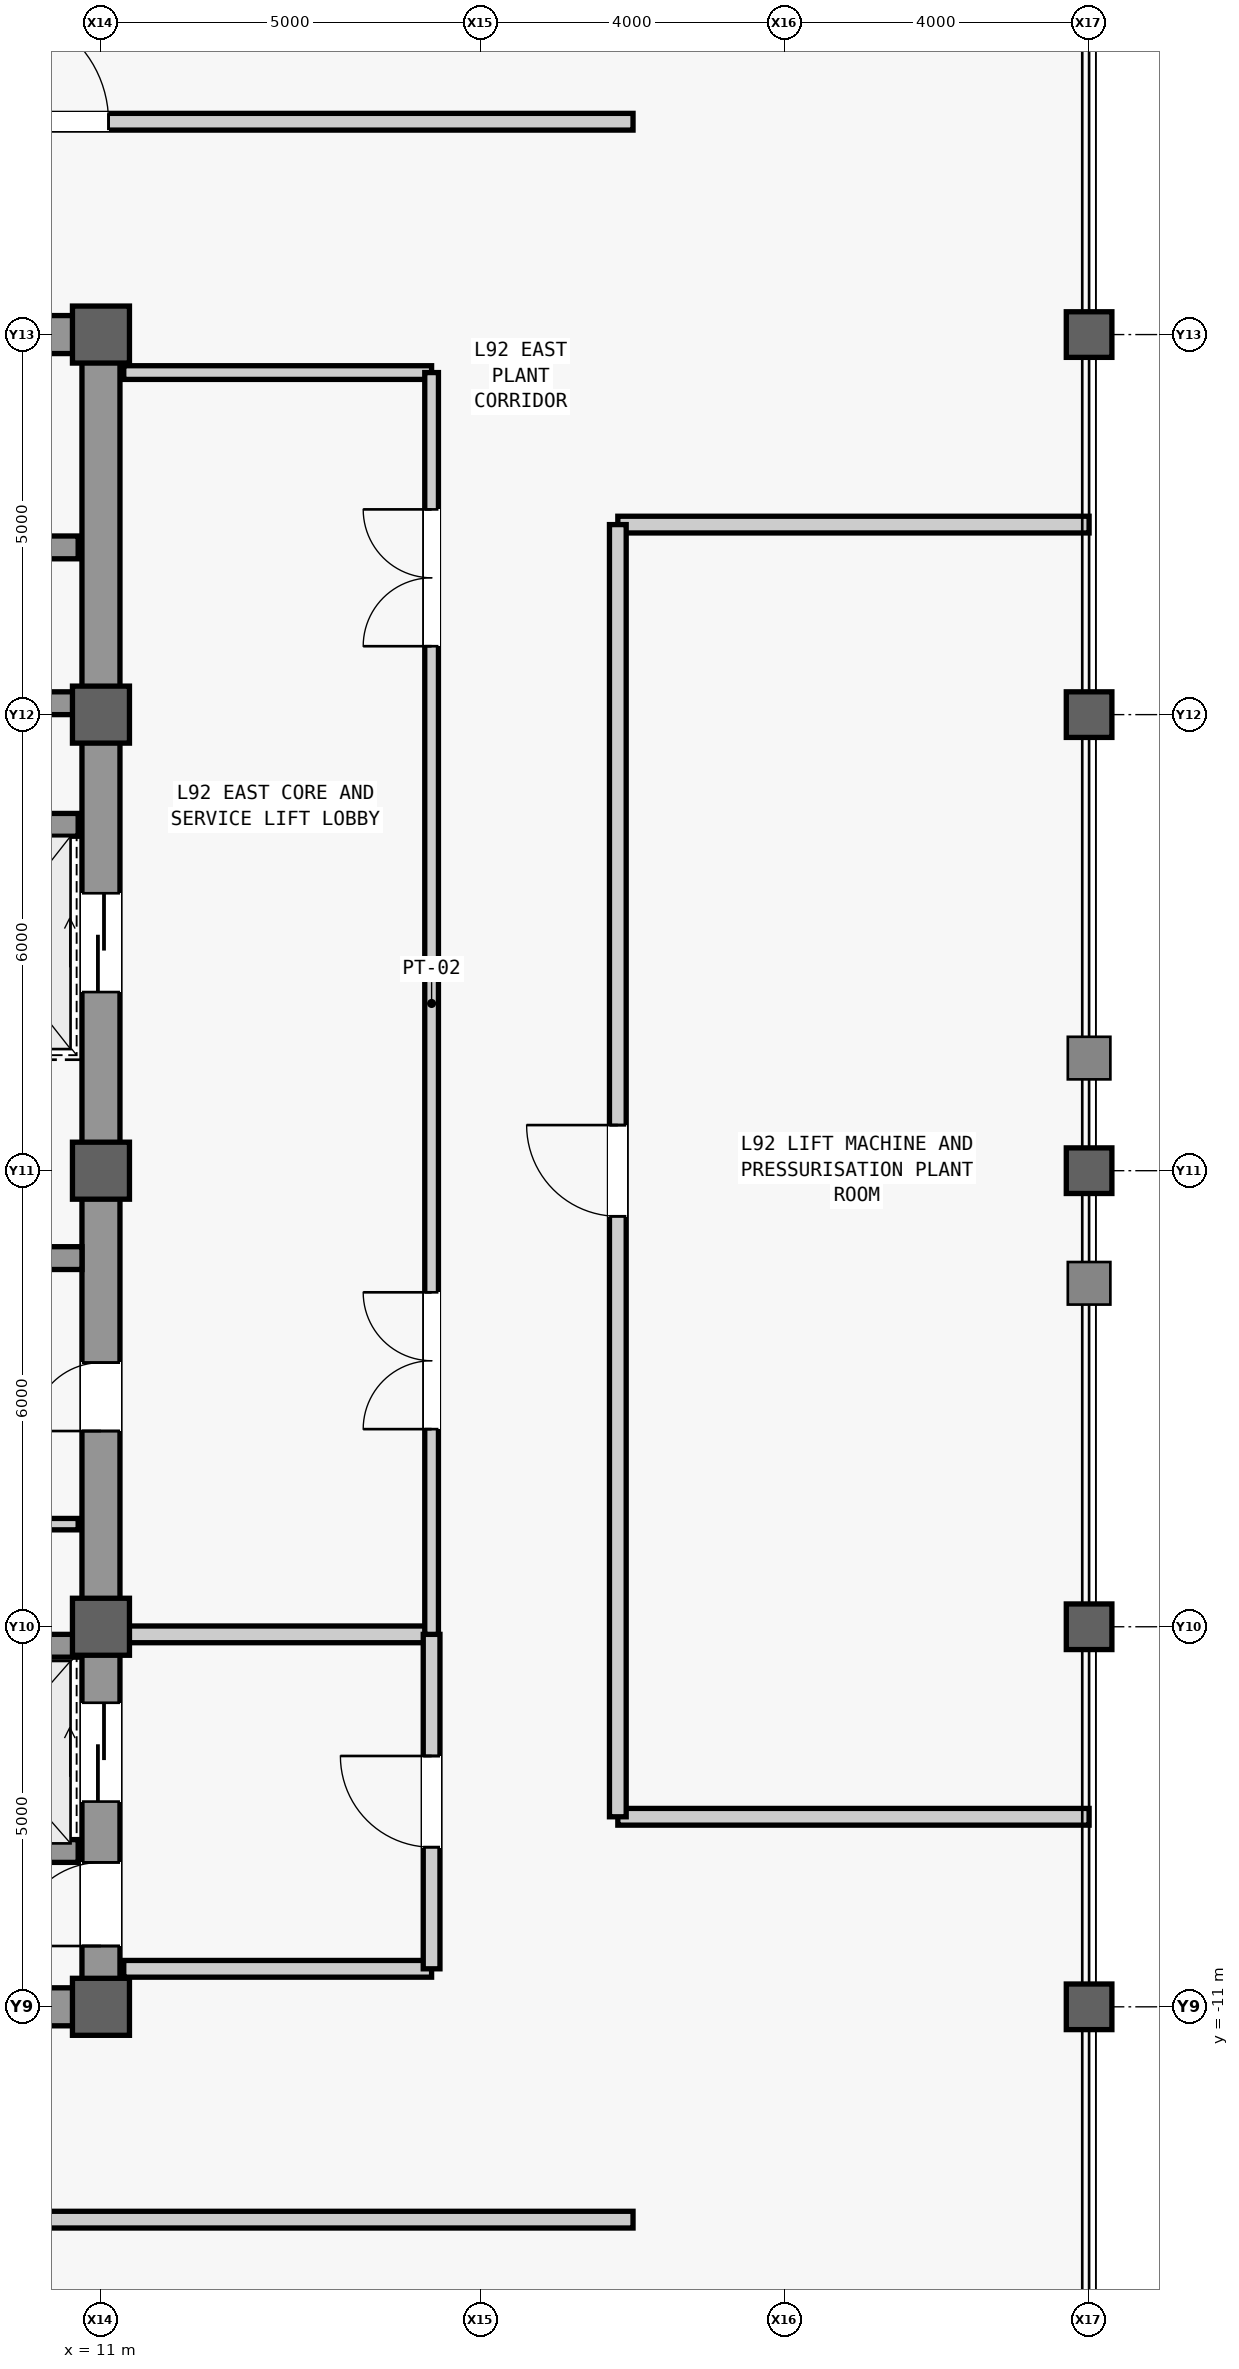
"""IFC4 building model, lengths in metres.
Left out: names, types, materials, properties, quantities, classifications, styles, units other than length and angle.
Written with IfcOpenShell. Run it as: python <this file> out.ifc"""

import sys

from ifc_helpers import new_model, si_unit, direction, frame, frame_2d, origin, origin_2d, place, context, subcontext, project, spatial, rectangle, hollow_rectangle, extrude, source, transform, mapped, element, fill, save


model = new_model("IFC4")
c1 = context("Model", 3, precision=1e-05, world=origin(), true_north=direction((0.0, 1.0)))
c2 = subcontext(c1, "Body", "Model", "MODEL_VIEW")
j1 = project(units=[si_unit("LENGTHUNIT", "METRE"), si_unit("PLANEANGLEUNIT", "RADIAN")], contexts=[c1])
p1 = place(None, origin())
s1 = spatial("IfcSite", under=j1, at=p1, CompositionType="ELEMENT")
p2 = place(p1, origin())
s2 = spatial("IfcBuilding", under=s1, at=p2, CompositionType="ELEMENT")
p3 = place(p2, frame((0.0, 0.0, 389.9)))
s3 = spatial("IfcBuildingStorey", under=s2, at=p3, CompositionType="ELEMENT", Elevation=389.9)
m1 = source(origin(), c2, "Body", "SweptSolid", [
    extrude(rectangle(XDim=22.0, YDim=0.5, at=frame_2d((11.0, 0.0))), origin(), (0.0, 0.0, 1.0), 4.45),
])
p4 = place(p3, frame((11.0, -11.0, 0.0), z_axis=(0.0, 0.0, 1.0), x_axis=(0.0, 1.0, 0.0)))
e1 = element("IfcWall", 1, at=p4, inside=s3, PredefinedType="SHEAR", context=c2, shape_type="MappedRepresentation", body=[
    mapped(m1, transform((0.0, 0.0, 0.0), scale=1.0)),
])
m2 = source(origin(), c2, "Body", "SweptSolid", [
    extrude(rectangle(XDim=1.1, YDim=2.2, at=frame_2d((0.55, 1.1))), frame((0.0, 0.26, 0.0), z_axis=(0.0, -1.0, 0.0), x_axis=(1.0, 0.0, 0.0)), (0.0, 0.0, 1.0), 0.52),
])
p5 = place(p4, frame((0.8, 0.0, 0.0)))
e2 = element("IfcOpeningElement", 2, at=p5, cuts=e1, PredefinedType="OPENING", context=c2, shape_type="MappedRepresentation", body=[
    mapped(m2, transform((0.0, 0.0, 0.0), scale=1.0)),
])
m3 = source(origin(), c2, "Body", "SweptSolid", [
    extrude(rectangle(XDim=0.9, YDim=2.15, at=frame_2d((0.45, 1.075))), frame((0.0, 0.26, 0.0), z_axis=(0.0, -1.0, 0.0), x_axis=(1.0, 0.0, 0.0)), (0.0, 0.0, 1.0), 0.52),
])
p6 = place(p4, frame((7.575, 0.0, 0.0)))
e3 = element("IfcOpeningElement", 3, at=p6, cuts=e1, PredefinedType="OPENING", context=c2, shape_type="MappedRepresentation", body=[
    mapped(m3, transform((0.0, 0.0, 0.0), scale=1.0)),
])
m4 = source(origin(), c2, "Body", "SweptSolid", [
    extrude(rectangle(XDim=1.3, YDim=2.3, at=frame_2d((0.65, 1.15))), frame((0.0, 0.26, 0.0), z_axis=(0.0, -1.0, 0.0), x_axis=(1.0, 0.0, 0.0)), (0.0, 0.0, 1.0), 0.52),
])
p7 = place(p4, frame((2.7, 0.0, 0.0)))
e4 = element("IfcOpeningElement", 4, at=p7, cuts=e1, PredefinedType="OPENING", context=c2, shape_type="MappedRepresentation", body=[
    mapped(m4, transform((0.0, 0.0, 0.0), scale=1.0)),
])
p8 = place(p4, frame((13.35, 0.0, 0.0)))
e5 = element("IfcOpeningElement", 5, at=p8, cuts=e1, PredefinedType="OPENING", context=c2, shape_type="MappedRepresentation", body=[
    mapped(m4, transform((0.0, 0.0, 0.0), scale=1.0)),
])
m5 = source(origin(), c2, "Body", "SweptSolid", [
    extrude(rectangle(XDim=5.9, YDim=0.5, at=frame_2d((2.95, 0.0))), origin(), (0.0, 0.0, 1.0), 4.45),
])
p9 = place(p3, frame((4.85, -11.0, 0.0), z_axis=(0.0, 0.0, 1.0), x_axis=(1.0, 0.0, 0.0)))
e6 = element("IfcWall", 6, at=p9, inside=s3, PredefinedType="SHEAR", context=c2, shape_type="MappedRepresentation", body=[
    mapped(m5, transform((0.0, 0.0, 0.0), scale=1.0)),
])
p10 = place(p3, frame((4.85, 11.0, 0.0), z_axis=(0.0, 0.0, 1.0), x_axis=(1.0, 0.0, 0.0)))
e7 = element("IfcWall", 7, at=p10, inside=s3, PredefinedType="SHEAR", context=c2, shape_type="MappedRepresentation", body=[
    mapped(m5, transform((0.0, 0.0, 0.0), scale=1.0)),
])
p11 = place(p10, frame((0.5, 0.0, 0.0)))
e8 = element("IfcOpeningElement", 8, at=p11, cuts=e7, PredefinedType="OPENING", context=c2, shape_type="MappedRepresentation", body=[
    mapped(m3, transform((0.0, 0.0, 0.0), scale=1.0)),
])
m6 = source(origin(), c2, "Body", "SweptSolid", [
    extrude(rectangle(XDim=5.65, YDim=0.3, at=frame_2d((2.825, 0.0))), origin(), (0.0, 0.0, 1.0), 4.45),
])
p12 = place(p3, frame((5.1, -1.15, 0.0), z_axis=(0.0, 0.0, 1.0), x_axis=(1.0, 0.0, 0.0)))
e9 = element("IfcWall", 9, at=p12, inside=s3, PredefinedType="SHEAR", context=c2, shape_type="MappedRepresentation", body=[
    mapped(m6, transform((0.0, 0.0, 0.0), scale=1.0)),
])
m7 = source(origin(), c2, "Body", "SweptSolid", [
    extrude(rectangle(XDim=0.75, YDim=0.75, at=origin_2d()), origin(), (0.0, 0.0, 1.0), 4.8),
])
for number, where, z_axis, x_axis in (
    (10, (11.0, -11.0, 0.0), (0.0, 0.0, 1.0), (1.0, 0.0, 0.0)),
    (11, (11.0, -6.0, 0.0), (0.0, 0.0, 1.0), (1.0, 0.0, 0.0)),
    (12, (11.0, 0.0, 0.0), (0.0, 0.0, 1.0), (1.0, 0.0, 0.0)),
    (13, (11.0, 6.0, 0.0), (0.0, 0.0, 1.0), (1.0, 0.0, 0.0)),
    (14, (11.0, 11.0, 0.0), (0.0, 0.0, 1.0), (1.0, 0.0, 0.0)),
):
    element("IfcColumn", number, at=place(p3, frame(where, z_axis=z_axis, x_axis=x_axis)), inside=s3, PredefinedType="COLUMN", context=c2, shape_type="MappedRepresentation", body=[
        mapped(m7, transform((0.0, 0.0, 0.0), scale=1.0)),
    ])
m8 = source(origin(), c2, "Body", "SweptSolid", [
    extrude(hollow_rectangle(XDim=0.6, YDim=0.6, WallThickness=0.035, at=origin_2d()), origin(), (0.0, 0.0, 1.0), 4.8),
])
for number, where, z_axis, x_axis in (
    (15, (24.0, -11.0, 0.0), (0.0, 0.0, 1.0), (1.0, 0.0, 0.0)),
    (16, (24.0, -6.0, 0.0), (0.0, 0.0, 1.0), (1.0, 0.0, 0.0)),
    (17, (24.0, 0.0, 0.0), (0.0, 0.0, 1.0), (1.0, 0.0, 0.0)),
    (18, (24.0, 6.0, 0.0), (0.0, 0.0, 1.0), (1.0, 0.0, 0.0)),
    (19, (24.0, 11.0, 0.0), (0.0, 0.0, 1.0), (1.0, 0.0, 0.0)),
):
    element("IfcColumn", number, at=place(p3, frame(where, z_axis=z_axis, x_axis=x_axis)), inside=s3, PredefinedType="COLUMN", context=c2, shape_type="MappedRepresentation", body=[
        mapped(m8, transform((0.0, 0.0, 0.0), scale=1.0)),
    ])
m9 = source(origin(), c2, "Body", "SweptSolid", [
    extrude(rectangle(XDim=2.2, YDim=0.3, at=frame_2d((1.1, 0.0))), origin(), (0.0, 0.0, 1.0), 4.45),
])
for number, where, z_axis, x_axis in (
    (20, (8.5, -8.95, 0.0), (0.0, 0.0, 1.0), (1.0, 0.0, 0.0)),
    (21, (8.5, -6.25, 0.0), (0.0, 0.0, 1.0), (1.0, 0.0, 0.0)),
):
    element("IfcWall", number, at=place(p3, frame(where, z_axis=z_axis, x_axis=x_axis)), inside=s3, PredefinedType="SHEAR", context=c2, shape_type="MappedRepresentation", body=[
        mapped(m9, transform((0.0, 0.0, 0.0), scale=1.0)),
    ])
m10 = source(origin(), c2, "Body", "SweptSolid", [
    extrude(rectangle(XDim=2.3, YDim=0.3, at=frame_2d((1.15, 0.0))), origin(), (0.0, 0.0, 1.0), 4.45),
])
for number, where, z_axis, x_axis in (
    (22, (8.4, 4.55, 0.0), (0.0, 0.0, 1.0), (1.0, 0.0, 0.0)),
    (23, (8.4, 6.15, 0.0), (0.0, 0.0, 1.0), (1.0, 0.0, 0.0)),
    (24, (8.4, 8.2, 0.0), (0.0, 0.0, 1.0), (1.0, 0.0, 0.0)),
):
    element("IfcWall", number, at=place(p3, frame(where, z_axis=z_axis, x_axis=x_axis)), inside=s3, PredefinedType="SHEAR", context=c2, shape_type="MappedRepresentation", body=[
        mapped(m10, transform((0.0, 0.0, 0.0), scale=1.0)),
    ])
m11 = source(origin(), c2, "Body", "SweptSolid", [
    extrude(rectangle(XDim=2.05, YDim=0.15, at=frame_2d((1.025, 0.0))), origin(), (0.0, 0.0, 1.0), 4.45),
])
p13 = place(p3, frame((8.65, -4.65, 0.0), z_axis=(0.0, 0.0, 1.0), x_axis=(1.0, 0.0, 0.0)))
e25 = element("IfcWall", 25, at=p13, inside=s3, PredefinedType="PARTITIONING", context=c2, shape_type="MappedRepresentation", body=[
    mapped(m11, transform((0.0, 0.0, 0.0), scale=1.0)),
])
m12 = source(origin(), c2, "Body", "SweptSolid", [
    extrude(rectangle(XDim=4.05, YDim=0.22, at=frame_2d((2.025, 0.0))), origin(), (0.0, 0.0, 1.0), 4.45),
])
p14 = place(p3, frame((11.3, -10.5, 0.0), z_axis=(0.0, 0.0, 1.0), x_axis=(1.0, 0.0, 0.0)))
e26 = element("IfcWall", 26, at=p14, inside=s3, PredefinedType="PARTITIONING", context=c2, shape_type="MappedRepresentation", body=[
    mapped(m12, transform((0.0, 0.0, 0.0), scale=1.0)),
])
m13 = source(origin(), c2, "Body", "SweptSolid", [
    extrude(rectangle(XDim=4.05, YDim=0.22, at=frame_2d((2.025, 0.0))), origin(), (0.0, 0.0, 1.0), 3.901),
])
p15 = place(p3, frame((11.3, -6.1, 0.0), z_axis=(0.0, 0.0, 1.0), x_axis=(1.0, 0.0, 0.0)))
e27 = element("IfcWall", 27, at=p15, inside=s3, PredefinedType="PARTITIONING", context=c2, shape_type="MappedRepresentation", body=[
    mapped(m13, transform((0.0, 0.0, 0.0), scale=1.0)),
])
m14 = source(origin(), c2, "Body", "SweptSolid", [
    extrude(rectangle(XDim=4.4, YDim=0.22, at=frame_2d((2.2, 0.0))), origin(), (0.0, 0.0, 1.0), 4.45),
])
p16 = place(p3, frame((15.35, -10.5, 0.0), z_axis=(0.0, 0.0, 1.0), x_axis=(0.0, 1.0, 0.0)))
e28 = element("IfcWall", 28, at=p16, inside=s3, PredefinedType="PARTITIONING", context=c2, shape_type="MappedRepresentation", body=[
    mapped(m14, transform((0.0, 0.0, 0.0), scale=1.0)),
])
m15 = source(origin(), c2, "Body", "SweptSolid", [
    extrude(rectangle(XDim=1.2, YDim=2.2, at=frame_2d((0.6, 1.1))), frame((0.0, 0.12, 0.0), z_axis=(0.0, -1.0, 0.0), x_axis=(1.0, 0.0, 0.0)), (0.0, 0.0, 1.0), 0.24),
])
p17 = place(p16, frame((1.6, 0.0, 0.0)))
e29 = element("IfcOpeningElement", 29, at=p17, cuts=e28, PredefinedType="OPENING", context=c2, shape_type="MappedRepresentation", body=[
    mapped(m15, transform((0.0, 0.0, 0.0), scale=1.0)),
])
m16 = source(origin(), c2, "Body", "SweptSolid", [
    extrude(rectangle(XDim=4.05, YDim=0.18, at=frame_2d((2.025, 0.0))), origin(), (0.0, 0.0, 1.0), 4.45),
])
p18 = place(p3, frame((11.3, 10.5, 0.0), z_axis=(0.0, 0.0, 1.0), x_axis=(1.0, 0.0, 0.0)))
e30 = element("IfcWall", 30, at=p18, inside=s3, PredefinedType="PARTITIONING", context=c2, shape_type="MappedRepresentation", body=[
    mapped(m16, transform((0.0, 0.0, 0.0), scale=1.0)),
])
m17 = source(origin(), c2, "Body", "SweptSolid", [
    extrude(rectangle(XDim=16.6, YDim=0.18, at=frame_2d((8.3, 0.0))), origin(), (0.0, 0.0, 1.0), 4.45),
])
p19 = place(p3, frame((15.35, -6.1, 0.0), z_axis=(0.0, 0.0, 1.0), x_axis=(0.0, 1.0, 0.0)))
e31 = element("IfcWall", 31, at=p19, inside=s3, PredefinedType="PARTITIONING", context=c2, shape_type="MappedRepresentation", body=[
    mapped(m17, transform((0.0, 0.0, 0.0), scale=1.0)),
])
m18 = source(origin(), c2, "Body", "SweptSolid", [
    extrude(rectangle(XDim=1.8, YDim=2.25, at=frame_2d((0.9, 1.125))), frame((0.0, 0.1, 0.0), z_axis=(0.0, -1.0, 0.0), x_axis=(1.0, 0.0, 0.0)), (0.0, 0.0, 1.0), 0.2),
])
p20 = place(p19, frame((2.7, 0.0, 0.0)))
e32 = element("IfcOpeningElement", 32, at=p20, cuts=e31, PredefinedType="OPENING", context=c2, shape_type="MappedRepresentation", body=[
    mapped(m18, transform((0.0, 0.0, 0.0), scale=1.0)),
])
p21 = place(p19, frame((13.0, 0.0, 0.0)))
e33 = element("IfcOpeningElement", 33, at=p21, cuts=e31, PredefinedType="OPENING", context=c2, shape_type="MappedRepresentation", body=[
    mapped(m18, transform((0.0, 0.0, 0.0), scale=1.0)),
])
m19 = source(origin(), c2, "Body", "SweptSolid", [
    extrude(rectangle(XDim=36.0, YDim=0.22, at=frame_2d((18.0, 0.0))), origin(), (0.0, 0.0, 1.0), 4.45),
])
p22 = place(p3, frame((-18.0, -13.8, 0.0), z_axis=(0.0, 0.0, 1.0), x_axis=(1.0, 0.0, 0.0)))
e34 = element("IfcWall", 34, at=p22, inside=s3, PredefinedType="PARTITIONING", context=c2, shape_type="MappedRepresentation", body=[
    mapped(m19, transform((0.0, 0.0, 0.0), scale=1.0)),
])
m20 = source(origin(), c2, "Body", "SweptSolid", [
    extrude(rectangle(XDim=1.5, YDim=2.3, at=frame_2d((0.75, 1.15))), frame((0.0, 0.12, 0.0), z_axis=(0.0, -1.0, 0.0), x_axis=(1.0, 0.0, 0.0)), (0.0, 0.0, 1.0), 0.24),
])
p23 = place(p22, frame((12.4, 0.0, 0.0)))
e35 = element("IfcOpeningElement", 35, at=p23, cuts=e34, PredefinedType="OPENING", context=c2, shape_type="MappedRepresentation", body=[
    mapped(m20, transform((0.0, 0.0, 0.0), scale=1.0)),
])
p24 = place(p22, frame((25.4, 0.0, 0.0)))
e36 = element("IfcOpeningElement", 36, at=p24, cuts=e34, PredefinedType="OPENING", context=c2, shape_type="MappedRepresentation", body=[
    mapped(m20, transform((0.0, 0.0, 0.0), scale=1.0)),
])
p25 = place(p3, frame((-18.0, 13.8, 0.0), z_axis=(0.0, 0.0, 1.0), x_axis=(1.0, 0.0, 0.0)))
e37 = element("IfcWall", 37, at=p25, inside=s3, PredefinedType="PARTITIONING", context=c2, shape_type="MappedRepresentation", body=[
    mapped(m19, transform((0.0, 0.0, 0.0), scale=1.0)),
])
p26 = place(p25, frame((9.45, 0.0, 0.0)))
e38 = element("IfcOpeningElement", 38, at=p26, cuts=e37, PredefinedType="OPENING", context=c2, shape_type="MappedRepresentation", body=[
    mapped(m20, transform((0.0, 0.0, 0.0), scale=1.0)),
])
p27 = place(p25, frame((19.15, 0.0, 0.0)))
e39 = element("IfcOpeningElement", 39, at=p27, cuts=e37, PredefinedType="OPENING", context=c2, shape_type="MappedRepresentation", body=[
    mapped(m20, transform((0.0, 0.0, 0.0), scale=1.0)),
])
p28 = place(p25, frame((27.6, 0.0, 0.0)))
e40 = element("IfcOpeningElement", 40, at=p28, cuts=e37, PredefinedType="OPENING", context=c2, shape_type="MappedRepresentation", body=[
    mapped(m20, transform((0.0, 0.0, 0.0), scale=1.0)),
])
m21 = source(origin(), c2, "Body", "SweptSolid", [
    extrude(rectangle(XDim=6.2, YDim=0.22, at=frame_2d((3.1, 0.0))), origin(), (0.0, 0.0, 1.0), 4.45),
])
for number, where, z_axis, x_axis in (
    (41, (17.8, -8.5, 0.0), (0.0, 0.0, 1.0), (1.0, 0.0, 0.0)),
    (42, (17.8, 8.5, 0.0), (0.0, 0.0, 1.0), (1.0, 0.0, 0.0)),
):
    element("IfcWall", number, at=place(p3, frame(where, z_axis=z_axis, x_axis=x_axis)), inside=s3, PredefinedType="PARTITIONING", context=c2, shape_type="MappedRepresentation", body=[
        mapped(m21, transform((0.0, 0.0, 0.0), scale=1.0)),
    ])
m22 = source(origin(), c2, "Body", "SweptSolid", [
    extrude(rectangle(XDim=17.0, YDim=0.22, at=frame_2d((8.5, 0.0))), origin(), (0.0, 0.0, 1.0), 4.45),
])
p29 = place(p3, frame((17.8, -8.5, 0.0), z_axis=(0.0, 0.0, 1.0), x_axis=(0.0, 1.0, 0.0)))
e43 = element("IfcWall", 43, at=p29, inside=s3, PredefinedType="PARTITIONING", context=c2, shape_type="MappedRepresentation", body=[
    mapped(m22, transform((0.0, 0.0, 0.0), scale=1.0)),
])
p30 = place(p29, frame((7.9, 0.0, 0.0)))
e44 = element("IfcOpeningElement", 44, at=p30, cuts=e43, PredefinedType="OPENING", context=c2, shape_type="MappedRepresentation", body=[
    mapped(m15, transform((0.0, 0.0, 0.0), scale=1.0)),
])
m23 = source(origin(), c2, "Body", "SweptSolid", [
    extrude(rectangle(XDim=1.1, YDim=2.2, at=frame_2d((0.55, 1.1))), frame((0.0, 0.025, 0.0), z_axis=(0.0, -1.0, 0.0), x_axis=(1.0, 0.0, 0.0)), (0.0, 0.0, 1.0), 0.05),
])
p31 = place(p5, origin())
e45 = element("IfcDoor", 45, at=p31, inside=s3, OperationType="SINGLE_SWING_LEFT", PredefinedType="DOOR", context=c2, shape_type="MappedRepresentation", body=[
    mapped(m23, transform((0.0, 0.0, 0.0), scale=1.0)),
])
fill(e2, e45)
m24 = source(origin(), c2, "Body", "SweptSolid", [
    extrude(rectangle(XDim=0.9, YDim=2.15, at=frame_2d((0.45, 1.075))), frame((0.0, 0.025, 0.0), z_axis=(0.0, -1.0, 0.0), x_axis=(1.0, 0.0, 0.0)), (0.0, 0.0, 1.0), 0.05),
])
p32 = place(p6, origin())
e46 = element("IfcDoor", 46, at=p32, inside=s3, OperationType="SINGLE_SWING_LEFT", PredefinedType="DOOR", context=c2, shape_type="MappedRepresentation", body=[
    mapped(m24, transform((0.0, 0.0, 0.0), scale=1.0)),
])
fill(e3, e46)
m25 = source(origin(), c2, "Body", "SweptSolid", [
    extrude(rectangle(XDim=1.2, YDim=2.2, at=frame_2d((0.6, 1.1))), frame((0.0, 0.025, 0.0), z_axis=(0.0, -1.0, 0.0), x_axis=(1.0, 0.0, 0.0)), (0.0, 0.0, 1.0), 0.05),
])
p33 = place(p17, origin())
e47 = element("IfcDoor", 47, at=p33, inside=s3, OperationType="SINGLE_SWING_RIGHT", PredefinedType="DOOR", context=c2, shape_type="MappedRepresentation", body=[
    mapped(m25, transform((0.0, 0.0, 0.0), scale=1.0)),
])
fill(e29, e47)
m26 = source(origin(), c2, "Body", "SweptSolid", [
    extrude(rectangle(XDim=1.8, YDim=2.25, at=frame_2d((0.9, 1.125))), frame((0.0, 0.025, 0.0), z_axis=(0.0, -1.0, 0.0), x_axis=(1.0, 0.0, 0.0)), (0.0, 0.0, 1.0), 0.05),
])
p34 = place(p20, origin())
e48 = element("IfcDoor", 48, at=p34, inside=s3, OperationType="SINGLE_SWING_RIGHT", PredefinedType="DOOR", context=c2, shape_type="MappedRepresentation", body=[
    mapped(m26, transform((0.0, 0.0, 0.0), scale=1.0)),
])
fill(e32, e48)
p35 = place(p21, origin())
e49 = element("IfcDoor", 49, at=p35, inside=s3, OperationType="SINGLE_SWING_LEFT", PredefinedType="DOOR", context=c2, shape_type="MappedRepresentation", body=[
    mapped(m26, transform((0.0, 0.0, 0.0), scale=1.0)),
])
fill(e33, e49)
m27 = source(origin(), c2, "Body", "SweptSolid", [
    extrude(rectangle(XDim=1.5, YDim=2.3, at=frame_2d((0.75, 1.15))), frame((0.0, 0.025, 0.0), z_axis=(0.0, -1.0, 0.0), x_axis=(1.0, 0.0, 0.0)), (0.0, 0.0, 1.0), 0.05),
])
p36 = place(p28, origin())
e50 = element("IfcDoor", 50, at=p36, inside=s3, OperationType="SINGLE_SWING_LEFT", PredefinedType="DOOR", context=c2, shape_type="MappedRepresentation", body=[
    mapped(m27, transform((0.0, 0.0, 0.0), scale=1.0)),
])
fill(e40, e50)
p37 = place(p30, origin())
e51 = element("IfcDoor", 51, at=p37, inside=s3, OperationType="SINGLE_SWING_RIGHT", PredefinedType="DOOR", context=c2, shape_type="MappedRepresentation", body=[
    mapped(m25, transform((0.0, 0.0, 0.0), scale=1.0)),
])
fill(e44, e51)
m28 = source(origin(), c2, "Body", "SweptSolid", [
    extrude(rectangle(XDim=1.3, YDim=2.3, at=frame_2d((0.65, 1.15))), frame((0.0, 0.025, 0.0), z_axis=(0.0, -1.0, 0.0), x_axis=(1.0, 0.0, 0.0)), (0.0, 0.0, 1.0), 0.05),
])
p38 = place(p7, origin())
e52 = element("IfcDoor", 52, at=p38, inside=s3, OperationType="SLIDING_TO_LEFT", PredefinedType="DOOR", context=c2, shape_type="MappedRepresentation", body=[
    mapped(m28, transform((0.0, 0.0, 0.0), scale=1.0)),
])
fill(e4, e52)
p39 = place(p8, origin())
e53 = element("IfcDoor", 53, at=p39, inside=s3, OperationType="SLIDING_TO_LEFT", PredefinedType="DOOR", context=c2, shape_type="MappedRepresentation", body=[
    mapped(m28, transform((0.0, 0.0, 0.0), scale=1.0)),
])
fill(e5, e53)
save(model, sys.argv[1])
